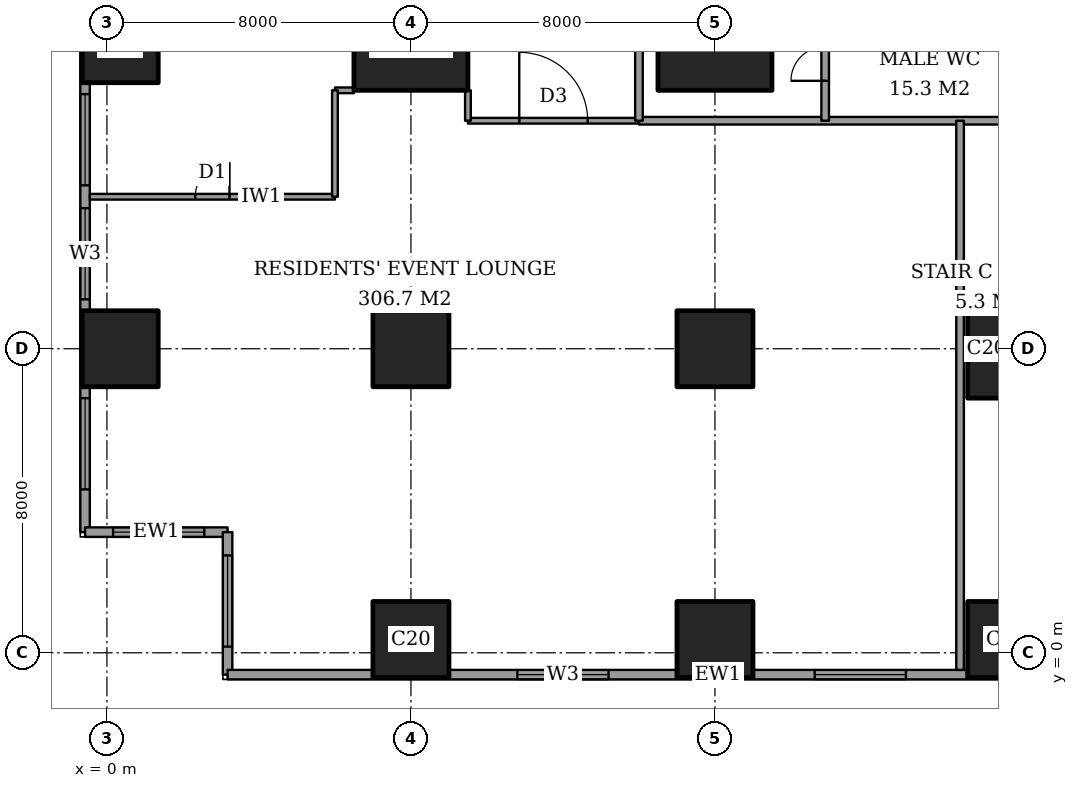
"""IFC4 building model, lengths in metres.
Left out: names, types, materials, properties, quantities, classifications, styles, units other than length and angle.
Written with IfcOpenShell. Run it as: python <this file> out.ifc"""

import sys

from ifc_helpers import new_model, si_unit, direction, frame, frame_2d, origin, origin_2d, place, context, subcontext, project, spatial, rectangle, extrude, element, fill, save


model = new_model("IFC4")
c1 = context("Model", 3, precision=1e-05, world=origin(), true_north=direction((0.0, 1.0)))
c2 = subcontext(c1, "Body", "Model", "MODEL_VIEW")
j1 = project(units=[si_unit("LENGTHUNIT", "METRE"), si_unit("PLANEANGLEUNIT", "RADIAN")], contexts=[c1])
p1 = place(None, origin())
s1 = spatial("IfcSite", under=j1, at=p1, CompositionType="ELEMENT")
p2 = place(p1, origin())
s2 = spatial("IfcBuilding", under=s1, at=p2, CompositionType="ELEMENT")
p3 = place(p2, frame((0.0, 0.0, 21.0)))
s3 = spatial("IfcBuildingStorey", under=s2, at=p3, CompositionType="ELEMENT", Elevation=21.0)
for number, where, z_axis, x_axis in (
    (1, (0.35, 8.0, 0.0), (0.0, 0.0, 1.0), (1.0, 0.0, 0.0)),
    (2, (0.35, 16.0, 0.0), (0.0, 0.0, 1.0), (1.0, 0.0, 0.0)),
    (3, (8.0, 0.35, 0.0), (0.0, 0.0, 1.0), (1.0, 0.0, 0.0)),
    (4, (8.0, 8.0, 0.0), (0.0, 0.0, 1.0), (1.0, 0.0, 0.0)),
):
    element("IfcColumn", number, at=place(p3, frame(where, z_axis=z_axis, x_axis=x_axis)), inside=s3, PredefinedType="COLUMN", context=c2, shape_type="SweptSolid", body=[
        extrude(rectangle(XDim=2.0, YDim=2.0, at=origin_2d()), origin(), (0.0, 0.0, 1.0), 5.0),
    ])
p4 = place(p3, frame((8.0, 16.0, 0.0), z_axis=(0.0, 0.0, 1.0), x_axis=(1.0, 0.0, 0.0)))
e5 = element("IfcColumn", 5, at=p4, inside=s3, PredefinedType="COLUMN", context=c2, shape_type="SweptSolid", body=[
    extrude(rectangle(XDim=3.0, YDim=2.4, at=origin_2d()), origin(), (0.0, 0.0, 1.0), 5.0),
])
for number, where, z_axis, x_axis in (
    (6, (16.0, 0.35, 0.0), (0.0, 0.0, 1.0), (1.0, 0.0, 0.0)),
    (7, (16.0, 8.0, 0.0), (0.0, 0.0, 1.0), (1.0, 0.0, 0.0)),
):
    element("IfcColumn", number, at=place(p3, frame(where, z_axis=z_axis, x_axis=x_axis)), inside=s3, PredefinedType="COLUMN", context=c2, shape_type="SweptSolid", body=[
        extrude(rectangle(XDim=2.0, YDim=2.0, at=origin_2d()), origin(), (0.0, 0.0, 1.0), 5.0),
    ])
p5 = place(p3, frame((16.0, 16.0, 0.0), z_axis=(0.0, 0.0, 1.0), x_axis=(1.0, 0.0, 0.0)))
e8 = element("IfcColumn", 8, at=p5, inside=s3, PredefinedType="COLUMN", context=c2, shape_type="SweptSolid", body=[
    extrude(rectangle(XDim=3.0, YDim=2.4, at=origin_2d()), origin(), (0.0, 0.0, 1.0), 5.0),
])
p6 = place(p3, frame((23.65, 0.35, 0.0), z_axis=(0.0, 0.0, 1.0), x_axis=(1.0, 0.0, 0.0)))
e9 = element("IfcColumn", 9, at=p6, inside=s3, PredefinedType="COLUMN", context=c2, shape_type="SweptSolid", body=[
    extrude(rectangle(XDim=2.0, YDim=2.0, at=origin_2d()), origin(), (0.0, 0.0, 1.0), 5.0),
])
p7 = place(p3, frame((23.65, 8.0, 0.0), z_axis=(0.0, 0.0, 1.0), x_axis=(1.0, 0.0, 0.0)))
e10 = element("IfcColumn", 10, at=p7, inside=s3, PredefinedType="COLUMN", context=c2, shape_type="SweptSolid", body=[
    extrude(rectangle(XDim=2.0, YDim=2.6, at=origin_2d()), origin(), (0.0, 0.0, 1.0), 5.0),
])
p8 = place(p3, frame((-0.575, 44.825, 0.0), z_axis=(0.0, 0.0, 1.0), x_axis=(0.0, -1.0, 0.0)))
e11 = element("IfcWall", 11, at=p8, inside=s3, PredefinedType="SOLIDWALL", context=c2, shape_type="SweptSolid", body=[
    extrude(rectangle(XDim=41.65, YDim=0.25, at=frame_2d((20.825, 0.0))), origin(), (0.0, 0.0, 1.0), 5.0),
])
p9 = place(p8, frame((6.725, 0.0, 0.6)))
e12 = element("IfcOpeningElement", 12, at=p9, cuts=e11, PredefinedType="OPENING", context=c2, shape_type="SweptSolid", body=[
    extrude(rectangle(XDim=1.2, YDim=3.0, at=frame_2d((0.6, 1.5))), frame((0.0, 0.135, 0.0), z_axis=(0.0, -1.0, 0.0), x_axis=(1.0, 0.0, 0.0)), (0.0, 0.0, 1.0), 0.27),
])
p10 = place(p8, frame((1.125, 0.0, 0.6)))
e13 = element("IfcOpeningElement", 13, at=p10, cuts=e11, PredefinedType="OPENING", context=c2, shape_type="SweptSolid", body=[
    extrude(rectangle(XDim=2.4, YDim=3.0, at=frame_2d((1.2, 1.5))), frame((0.0, 0.135, 0.0), z_axis=(0.0, -1.0, 0.0), x_axis=(1.0, 0.0, 0.0)), (0.0, 0.0, 1.0), 0.27),
])
p11 = place(p8, frame((9.125, 0.0, 0.6)))
e14 = element("IfcOpeningElement", 14, at=p11, cuts=e11, PredefinedType="OPENING", context=c2, shape_type="SweptSolid", body=[
    extrude(rectangle(XDim=2.4, YDim=3.0, at=frame_2d((1.2, 1.5))), frame((0.0, 0.135, 0.0), z_axis=(0.0, -1.0, 0.0), x_axis=(1.0, 0.0, 0.0)), (0.0, 0.0, 1.0), 0.27),
])
p12 = place(p8, frame((14.125, 0.0, 0.6)))
e15 = element("IfcOpeningElement", 15, at=p12, cuts=e11, PredefinedType="OPENING", context=c2, shape_type="SweptSolid", body=[
    extrude(rectangle(XDim=2.4, YDim=3.0, at=frame_2d((1.2, 1.5))), frame((0.0, 0.135, 0.0), z_axis=(0.0, -1.0, 0.0), x_axis=(1.0, 0.0, 0.0)), (0.0, 0.0, 1.0), 0.27),
])
p13 = place(p8, frame((17.125, 0.0, 0.6)))
e16 = element("IfcOpeningElement", 16, at=p13, cuts=e11, PredefinedType="OPENING", context=c2, shape_type="SweptSolid", body=[
    extrude(rectangle(XDim=2.4, YDim=3.0, at=frame_2d((1.2, 1.5))), frame((0.0, 0.135, 0.0), z_axis=(0.0, -1.0, 0.0), x_axis=(1.0, 0.0, 0.0)), (0.0, 0.0, 1.0), 0.27),
])
p14 = place(p8, frame((22.125, 0.0, 0.6)))
e17 = element("IfcOpeningElement", 17, at=p14, cuts=e11, PredefinedType="OPENING", context=c2, shape_type="SweptSolid", body=[
    extrude(rectangle(XDim=2.4, YDim=3.0, at=frame_2d((1.2, 1.5))), frame((0.0, 0.135, 0.0), z_axis=(0.0, -1.0, 0.0), x_axis=(1.0, 0.0, 0.0)), (0.0, 0.0, 1.0), 0.27),
])
p15 = place(p8, frame((25.125, 0.0, 0.6)))
e18 = element("IfcOpeningElement", 18, at=p15, cuts=e11, PredefinedType="OPENING", context=c2, shape_type="SweptSolid", body=[
    extrude(rectangle(XDim=2.4, YDim=3.0, at=frame_2d((1.2, 1.5))), frame((0.0, 0.135, 0.0), z_axis=(0.0, -1.0, 0.0), x_axis=(1.0, 0.0, 0.0)), (0.0, 0.0, 1.0), 0.27),
])
p16 = place(p8, frame((30.125, 0.0, 0.6)))
e19 = element("IfcOpeningElement", 19, at=p16, cuts=e11, PredefinedType="OPENING", context=c2, shape_type="SweptSolid", body=[
    extrude(rectangle(XDim=2.4, YDim=3.0, at=frame_2d((1.2, 1.5))), frame((0.0, 0.135, 0.0), z_axis=(0.0, -1.0, 0.0), x_axis=(1.0, 0.0, 0.0)), (0.0, 0.0, 1.0), 0.27),
])
p17 = place(p8, frame((33.125, 0.0, 0.6)))
e20 = element("IfcOpeningElement", 20, at=p17, cuts=e11, PredefinedType="OPENING", context=c2, shape_type="SweptSolid", body=[
    extrude(rectangle(XDim=2.4, YDim=3.0, at=frame_2d((1.2, 1.5))), frame((0.0, 0.135, 0.0), z_axis=(0.0, -1.0, 0.0), x_axis=(1.0, 0.0, 0.0)), (0.0, 0.0, 1.0), 0.27),
])
p18 = place(p8, frame((38.125, 0.0, 0.6)))
e21 = element("IfcOpeningElement", 21, at=p18, cuts=e11, PredefinedType="OPENING", context=c2, shape_type="SweptSolid", body=[
    extrude(rectangle(XDim=2.4, YDim=3.0, at=frame_2d((1.2, 1.5))), frame((0.0, 0.135, 0.0), z_axis=(0.0, -1.0, 0.0), x_axis=(1.0, 0.0, 0.0)), (0.0, 0.0, 1.0), 0.27),
])
p19 = place(p3, frame((-0.575, 3.175, 0.0), z_axis=(0.0, 0.0, 1.0), x_axis=(1.0, 0.0, 0.0)))
e22 = element("IfcWall", 22, at=p19, inside=s3, PredefinedType="SOLIDWALL", context=c2, shape_type="SweptSolid", body=[
    extrude(rectangle(XDim=3.75, YDim=0.25, at=frame_2d((1.875, 0.0))), origin(), (0.0, 0.0, 1.0), 5.0),
])
p20 = place(p19, frame((0.738, 0.0, 0.6)))
e23 = element("IfcOpeningElement", 23, at=p20, cuts=e22, PredefinedType="OPENING", context=c2, shape_type="SweptSolid", body=[
    extrude(rectangle(XDim=2.4, YDim=3.0, at=frame_2d((1.2, 1.5))), frame((0.0, 0.135, 0.0), z_axis=(0.0, -1.0, 0.0), x_axis=(1.0, 0.0, 0.0)), (0.0, 0.0, 1.0), 0.27),
])
p21 = place(p3, frame((3.175, 3.175, 0.0), z_axis=(0.0, 0.0, 1.0), x_axis=(0.0, -1.0, 0.0)))
e24 = element("IfcWall", 24, at=p21, inside=s3, PredefinedType="SOLIDWALL", context=c2, shape_type="SweptSolid", body=[
    extrude(rectangle(XDim=3.75, YDim=0.25, at=frame_2d((1.875, 0.0))), origin(), (0.0, 0.0, 1.0), 5.0),
])
p22 = place(p21, frame((0.613, 0.0, 0.6)))
e25 = element("IfcOpeningElement", 25, at=p22, cuts=e24, PredefinedType="OPENING", context=c2, shape_type="SweptSolid", body=[
    extrude(rectangle(XDim=2.4, YDim=3.0, at=frame_2d((1.2, 1.5))), frame((0.0, 0.135, 0.0), z_axis=(0.0, -1.0, 0.0), x_axis=(1.0, 0.0, 0.0)), (0.0, 0.0, 1.0), 0.27),
])
p23 = place(p3, frame((3.175, -0.575, 0.0), z_axis=(0.0, 0.0, 1.0), x_axis=(1.0, 0.0, 0.0)))
e26 = element("IfcWall", 26, at=p23, inside=s3, PredefinedType="SOLIDWALL", context=c2, shape_type="SweptSolid", body=[
    extrude(rectangle(XDim=25.807, YDim=0.25, at=frame_2d((12.903, 0.0))), origin(), (0.0, 0.0, 1.0), 5.0),
])
p24 = place(p23, frame((7.625, 0.0, 0.6)))
e27 = element("IfcOpeningElement", 27, at=p24, cuts=e26, PredefinedType="OPENING", context=c2, shape_type="SweptSolid", body=[
    extrude(rectangle(XDim=2.4, YDim=3.0, at=frame_2d((1.2, 1.5))), frame((0.0, 0.135, 0.0), z_axis=(0.0, -1.0, 0.0), x_axis=(1.0, 0.0, 0.0)), (0.0, 0.0, 1.0), 0.27),
])
p25 = place(p23, frame((15.45, 0.0, 0.6)))
e28 = element("IfcOpeningElement", 28, at=p25, cuts=e26, PredefinedType="OPENING", context=c2, shape_type="SweptSolid", body=[
    extrude(rectangle(XDim=2.4, YDim=3.0, at=frame_2d((1.2, 1.5))), frame((0.0, 0.135, 0.0), z_axis=(0.0, -1.0, 0.0), x_axis=(1.0, 0.0, 0.0)), (0.0, 0.0, 1.0), 0.27),
])
p26 = place(p23, frame((22.225, 0.0, 0.6)))
e29 = element("IfcOpeningElement", 29, at=p26, cuts=e26, PredefinedType="OPENING", context=c2, shape_type="SweptSolid", body=[
    extrude(rectangle(XDim=2.4, YDim=3.0, at=frame_2d((1.2, 1.5))), frame((0.0, 0.135, 0.0), z_axis=(0.0, -1.0, 0.0), x_axis=(1.0, 0.0, 0.0)), (0.0, 0.0, 1.0), 0.27),
])
p27 = place(p3, frame((-0.45, 12.0, 0.0), z_axis=(0.0, 0.0, 1.0), x_axis=(1.0, 0.0, 0.0)))
e30 = element("IfcWall", 30, at=p27, inside=s3, PredefinedType="PARTITIONING", context=c2, shape_type="SweptSolid", body=[
    extrude(rectangle(XDim=6.45, YDim=0.15, at=frame_2d((3.225, 0.0))), origin(), (0.0, 0.0, 1.0), 4.65),
])
p28 = place(p27, frame((2.775, 0.0, 0.0)))
e31 = element("IfcOpeningElement", 31, at=p28, cuts=e30, PredefinedType="OPENING", context=c2, shape_type="SweptSolid", body=[
    extrude(rectangle(XDim=0.9, YDim=2.1, at=frame_2d((0.45, 1.05))), frame((0.0, 0.085, 0.0), z_axis=(0.0, -1.0, 0.0), x_axis=(1.0, 0.0, 0.0)), (0.0, 0.0, 1.0), 0.17),
])
p29 = place(p3, frame((14.0, 14.0, 0.0), z_axis=(0.0, 0.0, 1.0), x_axis=(1.0, 0.0, 0.0)))
e32 = element("IfcWall", 32, at=p29, inside=s3, PredefinedType="PARTITIONING", context=c2, shape_type="SweptSolid", body=[
    extrude(rectangle(XDim=10.0, YDim=0.2, at=frame_2d((5.0, 0.0))), origin(), (0.0, 0.0, 1.0), 4.65),
])
p30 = place(p3, frame((9.5, 14.0, 0.0), z_axis=(0.0, 0.0, 1.0), x_axis=(1.0, 0.0, 0.0)))
e33 = element("IfcWall", 33, at=p30, inside=s3, PredefinedType="PARTITIONING", context=c2, shape_type="SweptSolid", body=[
    extrude(rectangle(XDim=4.5, YDim=0.15, at=frame_2d((2.25, 0.0))), origin(), (0.0, 0.0, 1.0), 4.65),
])
p31 = place(p30, frame((1.35, 0.0, 0.0)))
e34 = element("IfcOpeningElement", 34, at=p31, cuts=e33, PredefinedType="OPENING", context=c2, shape_type="SweptSolid", body=[
    extrude(rectangle(XDim=1.8, YDim=2.1, at=frame_2d((0.9, 1.05))), frame((0.0, 0.085, 0.0), z_axis=(0.0, -1.0, 0.0), x_axis=(1.0, 0.0, 0.0)), (0.0, 0.0, 1.0), 0.17),
])
p32 = place(p3, frame((6.0, 14.8, 0.0), z_axis=(0.0, 0.0, 1.0), x_axis=(1.0, 0.0, 0.0)))
e35 = element("IfcWall", 35, at=p32, inside=s3, PredefinedType="PARTITIONING", context=c2, shape_type="SweptSolid", body=[
    extrude(rectangle(XDim=0.5, YDim=0.15, at=frame_2d((0.25, 0.0))), origin(), (0.0, 0.0, 1.0), 4.65),
])
p33 = place(p3, frame((6.0, 12.0, 0.0), z_axis=(0.0, 0.0, 1.0), x_axis=(0.0, 1.0, 0.0)))
e36 = element("IfcWall", 36, at=p33, inside=s3, PredefinedType="PARTITIONING", context=c2, shape_type="SweptSolid", body=[
    extrude(rectangle(XDim=2.8, YDim=0.15, at=frame_2d((1.4, 0.0))), origin(), (0.0, 0.0, 1.0), 4.65),
])
p34 = place(p3, frame((9.5, 14.0, 0.0), z_axis=(0.0, 0.0, 1.0), x_axis=(0.0, 1.0, 0.0)))
e37 = element("IfcWall", 37, at=p34, inside=s3, PredefinedType="PARTITIONING", context=c2, shape_type="SweptSolid", body=[
    extrude(rectangle(XDim=0.8, YDim=0.15, at=frame_2d((0.4, 0.0))), origin(), (0.0, 0.0, 1.0), 4.65),
])
p35 = place(p3, frame((14.0, 14.0, 0.0), z_axis=(0.0, 0.0, 1.0), x_axis=(0.0, 1.0, 0.0)))
e38 = element("IfcWall", 38, at=p35, inside=s3, PredefinedType="PARTITIONING", context=c2, shape_type="SweptSolid", body=[
    extrude(rectangle(XDim=9.0, YDim=0.2, at=frame_2d((4.5, 0.0))), origin(), (0.0, 0.0, 1.0), 4.65),
])
p36 = place(p35, frame((4.0, 0.0, 0.0)))
e39 = element("IfcOpeningElement", 39, at=p36, cuts=e38, PredefinedType="OPENING", context=c2, shape_type="SweptSolid", body=[
    extrude(rectangle(XDim=1.0, YDim=2.1, at=frame_2d((0.5, 1.05))), frame((0.0, 0.11, 0.0), z_axis=(0.0, -1.0, 0.0), x_axis=(1.0, 0.0, 0.0)), (0.0, 0.0, 1.0), 0.22),
])
p37 = place(p3, frame((18.9, 14.0, 0.0), z_axis=(0.0, 0.0, 1.0), x_axis=(0.0, 1.0, 0.0)))
e40 = element("IfcWall", 40, at=p37, inside=s3, PredefinedType="PARTITIONING", context=c2, shape_type="SweptSolid", body=[
    extrude(rectangle(XDim=6.0, YDim=0.2, at=frame_2d((3.0, 0.0))), origin(), (0.0, 0.0, 1.0), 4.65),
])
p38 = place(p37, frame((1.05, 0.0, 0.0)))
e41 = element("IfcOpeningElement", 41, at=p38, cuts=e40, PredefinedType="OPENING", context=c2, shape_type="SweptSolid", body=[
    extrude(rectangle(XDim=0.9, YDim=2.1, at=frame_2d((0.45, 1.05))), frame((0.0, 0.11, 0.0), z_axis=(0.0, -1.0, 0.0), x_axis=(1.0, 0.0, 0.0)), (0.0, 0.0, 1.0), 0.22),
])
p39 = place(p37, frame((4.05, 0.0, 0.0)))
e42 = element("IfcOpeningElement", 42, at=p39, cuts=e40, PredefinedType="OPENING", context=c2, shape_type="SweptSolid", body=[
    extrude(rectangle(XDim=0.9, YDim=2.1, at=frame_2d((0.45, 1.05))), frame((0.0, 0.11, 0.0), z_axis=(0.0, -1.0, 0.0), x_axis=(1.0, 0.0, 0.0)), (0.0, 0.0, 1.0), 0.22),
])
p40 = place(p3, frame((22.45, -0.45, 0.0), z_axis=(0.0, 0.0, 1.0), x_axis=(0.0, 1.0, 0.0)))
e43 = element("IfcWall", 43, at=p40, inside=s3, PredefinedType="PARTITIONING", context=c2, shape_type="SweptSolid", body=[
    extrude(rectangle(XDim=14.45, YDim=0.2, at=frame_2d((7.225, 0.0))), origin(), (0.0, 0.0, 1.0), 4.65),
])
p41 = place(p16, origin())
e44 = element("IfcWindow", 44, at=p41, inside=s3, PartitioningType="SINGLE_PANEL", PredefinedType="WINDOW", context=c2, shape_type="SweptSolid", body=[
    extrude(rectangle(XDim=2.4, YDim=3.0, at=frame_2d((1.2, 1.5))), frame((0.0, 0.03, 0.0), z_axis=(0.0, -1.0, 0.0), x_axis=(1.0, 0.0, 0.0)), (0.0, 0.0, 1.0), 0.06),
])
fill(e19, e44)
p42 = place(p17, origin())
e45 = element("IfcWindow", 45, at=p42, inside=s3, PartitioningType="SINGLE_PANEL", PredefinedType="WINDOW", context=c2, shape_type="SweptSolid", body=[
    extrude(rectangle(XDim=2.4, YDim=3.0, at=frame_2d((1.2, 1.5))), frame((0.0, 0.03, 0.0), z_axis=(0.0, -1.0, 0.0), x_axis=(1.0, 0.0, 0.0)), (0.0, 0.0, 1.0), 0.06),
])
fill(e20, e45)
p43 = place(p18, origin())
e46 = element("IfcWindow", 46, at=p43, inside=s3, PartitioningType="SINGLE_PANEL", PredefinedType="WINDOW", context=c2, shape_type="SweptSolid", body=[
    extrude(rectangle(XDim=2.4, YDim=3.0, at=frame_2d((1.2, 1.5))), frame((0.0, 0.03, 0.0), z_axis=(0.0, -1.0, 0.0), x_axis=(1.0, 0.0, 0.0)), (0.0, 0.0, 1.0), 0.06),
])
fill(e21, e46)
p44 = place(p20, origin())
e47 = element("IfcWindow", 47, at=p44, inside=s3, PartitioningType="SINGLE_PANEL", PredefinedType="WINDOW", context=c2, shape_type="SweptSolid", body=[
    extrude(rectangle(XDim=2.4, YDim=3.0, at=frame_2d((1.2, 1.5))), frame((0.0, 0.03, 0.0), z_axis=(0.0, -1.0, 0.0), x_axis=(1.0, 0.0, 0.0)), (0.0, 0.0, 1.0), 0.06),
])
fill(e23, e47)
p45 = place(p22, origin())
e48 = element("IfcWindow", 48, at=p45, inside=s3, PartitioningType="SINGLE_PANEL", PredefinedType="WINDOW", context=c2, shape_type="SweptSolid", body=[
    extrude(rectangle(XDim=2.4, YDim=3.0, at=frame_2d((1.2, 1.5))), frame((0.0, 0.03, 0.0), z_axis=(0.0, -1.0, 0.0), x_axis=(1.0, 0.0, 0.0)), (0.0, 0.0, 1.0), 0.06),
])
fill(e25, e48)
p46 = place(p24, origin())
e49 = element("IfcWindow", 49, at=p46, inside=s3, PartitioningType="SINGLE_PANEL", PredefinedType="WINDOW", context=c2, shape_type="SweptSolid", body=[
    extrude(rectangle(XDim=2.4, YDim=3.0, at=frame_2d((1.2, 1.5))), frame((0.0, 0.03, 0.0), z_axis=(0.0, -1.0, 0.0), x_axis=(1.0, 0.0, 0.0)), (0.0, 0.0, 1.0), 0.06),
])
fill(e27, e49)
p47 = place(p25, origin())
e50 = element("IfcWindow", 50, at=p47, inside=s3, PartitioningType="SINGLE_PANEL", PredefinedType="WINDOW", context=c2, shape_type="SweptSolid", body=[
    extrude(rectangle(XDim=2.4, YDim=3.0, at=frame_2d((1.2, 1.5))), frame((0.0, 0.03, 0.0), z_axis=(0.0, -1.0, 0.0), x_axis=(1.0, 0.0, 0.0)), (0.0, 0.0, 1.0), 0.06),
])
fill(e28, e50)
p48 = place(p28, origin())
e51 = element("IfcDoor", 51, at=p48, inside=s3, OperationType="SINGLE_SWING_LEFT", PredefinedType="DOOR", context=c2, shape_type="SweptSolid", body=[
    extrude(rectangle(XDim=0.9, YDim=2.1, at=frame_2d((0.45, 1.05))), frame((0.0, 0.025, 0.0), z_axis=(0.0, -1.0, 0.0), x_axis=(1.0, 0.0, 0.0)), (0.0, 0.0, 1.0), 0.05),
])
fill(e31, e51)
p49 = place(p31, origin())
e52 = element("IfcDoor", 52, at=p49, inside=s3, OperationType="DOUBLE_DOOR_DOUBLE_SWING", PredefinedType="DOOR", context=c2, shape_type="SweptSolid", body=[
    extrude(rectangle(XDim=1.8, YDim=2.1, at=frame_2d((0.9, 1.05))), frame((0.0, 0.025, 0.0), z_axis=(0.0, -1.0, 0.0), x_axis=(1.0, 0.0, 0.0)), (0.0, 0.0, 1.0), 0.05),
])
fill(e34, e52)
p50 = place(p38, origin())
e53 = element("IfcDoor", 53, at=p50, inside=s3, OperationType="SINGLE_SWING_RIGHT", PredefinedType="DOOR", context=c2, shape_type="SweptSolid", body=[
    extrude(rectangle(XDim=0.9, YDim=2.1, at=frame_2d((0.45, 1.05))), frame((0.0, 0.025, 0.0), z_axis=(0.0, -1.0, 0.0), x_axis=(1.0, 0.0, 0.0)), (0.0, 0.0, 1.0), 0.05),
])
fill(e41, e53)
save(model, sys.argv[1])
